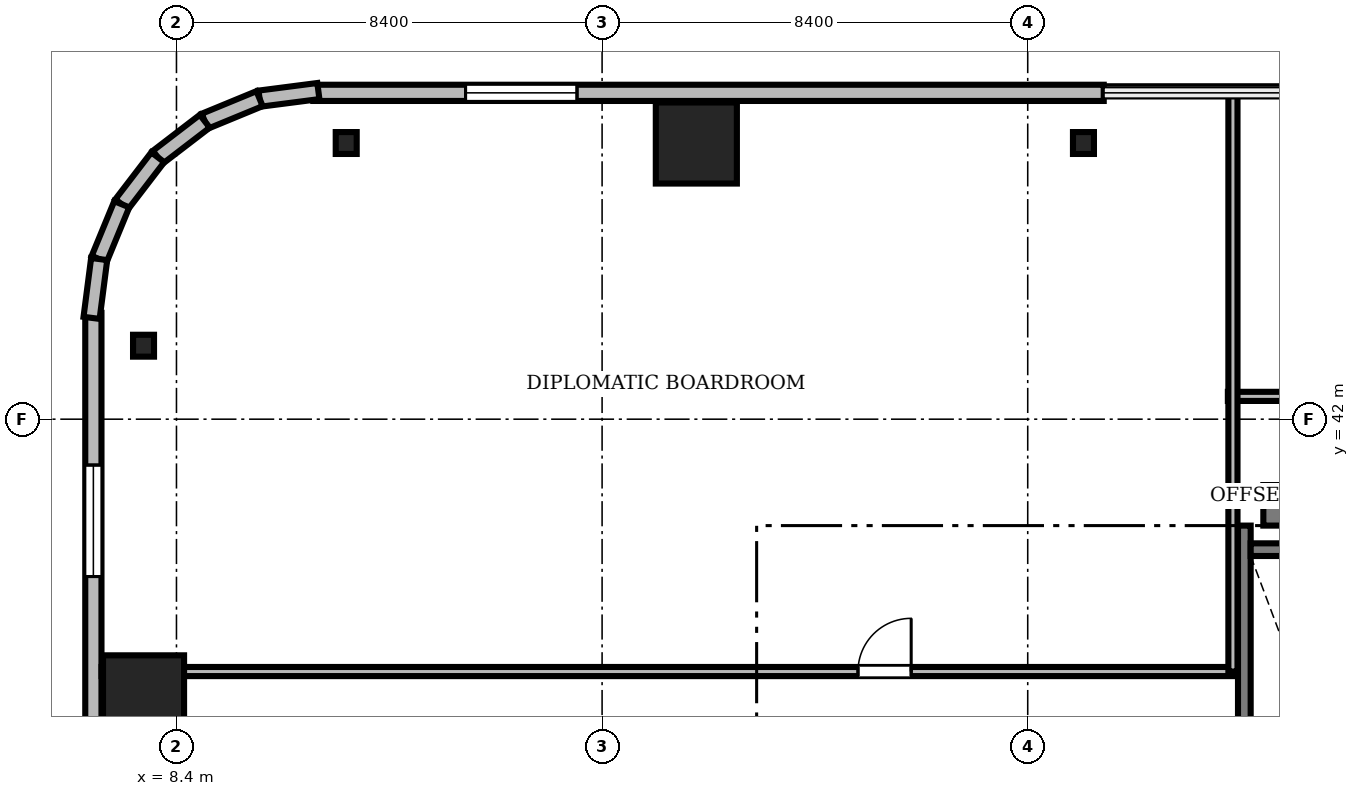
"""IFC4 building model, lengths in metres.
Left out: names, types, materials, properties, quantities, classifications, styles, units other than length and angle.
Written with IfcOpenShell. Run it as: python <this file> out.ifc"""

import sys

from ifc_helpers import new_model, si_unit, direction, frame, frame_2d, origin, origin_2d, place, context, subcontext, project, spatial, rectangle, i_section, extrude, source, transform, mapped, element, fill, save


model = new_model("IFC4")
c1 = context("Model", 3, precision=1e-05, world=origin(), true_north=direction((0.0, 1.0)))
c2 = subcontext(c1, "Body", "Model", "MODEL_VIEW")
j1 = project(units=[si_unit("LENGTHUNIT", "METRE"), si_unit("PLANEANGLEUNIT", "RADIAN")], contexts=[c1])
p1 = place(None, origin())
s1 = spatial("IfcSite", under=j1, at=p1, CompositionType="ELEMENT")
p2 = place(p1, origin())
s2 = spatial("IfcBuilding", under=s1, at=p2, CompositionType="ELEMENT")
p3 = place(p2, frame((0.0, 0.0, 107.5)))
s3 = spatial("IfcBuildingStorey", under=s2, at=p3, CompositionType="ELEMENT", Elevation=107.5)
m1 = source(origin(), c2, "Body", "SweptSolid", [
    extrude(rectangle(XDim=17.52, YDim=0.8, at=frame_2d((8.76, 0.0))), origin(), (0.0, 0.0, 1.0), 3.56),
])
p4 = place(p3, frame((29.85, 40.3, 0.0), z_axis=(0.0, 0.0, 1.0), x_axis=(1.0, 0.0, 0.0)))
e1 = element("IfcWall", 1, at=p4, inside=s3, PredefinedType="SHEAR", context=c2, shape_type="MappedRepresentation", body=[
    mapped(m1, transform((0.0, 0.0, 0.0), scale=1.0)),
])
m2 = source(origin(), c2, "Body", "SweptSolid", [
    extrude(rectangle(XDim=1.6, YDim=1.6, at=origin_2d()), origin(), (0.0, 0.0, 1.0), 3.56),
])
for number, where, z_axis, x_axis in (
    (2, (18.66, 47.45, 0.0), (0.0, 0.0, 1.0), (1.0, 0.0, 0.0)),
    (3, (7.75, 36.54, 0.0), (0.0, 0.0, 1.0), (1.0, 0.0, 0.0)),
):
    element("IfcColumn", number, at=place(p3, frame(where, z_axis=z_axis, x_axis=x_axis)), inside=s3, PredefinedType="COLUMN", context=c2, shape_type="MappedRepresentation", body=[
        mapped(m2, transform((0.0, 0.0, 0.0), scale=1.0)),
    ])
m3 = source(origin(), c2, "Body", "SweptSolid", [
    extrude(i_section(OverallWidth=0.414, OverallDepth=0.432, WebThickness=0.026, FlangeThickness=0.04, FilletRadius=0.015, at=origin_2d()), origin(), (0.0, 0.0, 1.0), 3.56),
])
for number, where, z_axis, x_axis in (
    (4, (26.3, 47.45, 0.0), (0.0, 0.0, 1.0), (1.0, 0.0, 0.0)),
    (5, (11.75, 47.45, 0.0), (0.0, 0.0, 1.0), (1.0, 0.0, 0.0)),
    (6, (7.75, 43.45, 0.0), (0.0, 0.0, 1.0), (1.0, 0.0, 0.0)),
):
    element("IfcColumn", number, at=place(p3, frame(where, z_axis=z_axis, x_axis=x_axis)), inside=s3, PredefinedType="COLUMN", context=c2, shape_type="MappedRepresentation", body=[
        mapped(m3, transform((0.0, 0.0, 0.0), scale=1.0)),
    ])
m4 = source(origin(), c2, "Body", "SweptSolid", [
    extrude(rectangle(XDim=15.6, YDim=0.32, at=frame_2d((7.8, 0.0))), origin(), (0.0, 0.0, 1.0), 3.56),
])
p5 = place(p3, frame((26.7, 48.44, 0.0), z_axis=(0.0, 0.0, 1.0), x_axis=(-1.0, 0.0, 0.0)))
e7 = element("IfcWall", 7, at=p5, inside=s3, PredefinedType="SOLIDWALL", context=c2, shape_type="MappedRepresentation", body=[
    mapped(m4, transform((0.0, 0.0, 0.0), scale=1.0)),
])
m5 = source(origin(), c2, "Body", "SweptSolid", [
    extrude(rectangle(XDim=2.2, YDim=2.4, at=frame_2d((1.1, 1.2))), frame((0.0, 0.17, 0.0), z_axis=(0.0, -1.0, 0.0), x_axis=(1.0, 0.0, 0.0)), (0.0, 0.0, 1.0), 0.34),
])
p6 = place(p5, frame((10.395, 0.0, 0.72)))
e8 = element("IfcOpeningElement", 8, at=p6, cuts=e7, PredefinedType="OPENING", context=c2, shape_type="MappedRepresentation", body=[
    mapped(m5, transform((0.0, 0.0, 0.0), scale=1.0)),
])
m6 = source(origin(), c2, "Body", "SweptSolid", [
    extrude(rectangle(XDim=15.6, YDim=0.32, at=frame_2d((7.8, 0.0))), origin(), (0.0, 0.0, 1.0), 3.56),
])
p7 = place(p3, frame((6.76, 44.1, 0.0), z_axis=(0.0, 0.0, 1.0), x_axis=(0.0, -1.0, 0.0)))
e9 = element("IfcWall", 9, at=p7, inside=s3, PredefinedType="SOLIDWALL", context=c2, shape_type="MappedRepresentation", body=[
    mapped(m6, transform((0.0, 0.0, 0.0), scale=1.0)),
])
m7 = source(origin(), c2, "Body", "SweptSolid", [
    extrude(rectangle(XDim=1.4, YDim=2.3, at=frame_2d((0.7, 1.15))), frame((0.0, 0.17, 0.0), z_axis=(0.0, -1.0, 0.0), x_axis=(1.0, 0.0, 0.0)), (0.0, 0.0, 1.0), 0.34),
])
p8 = place(p7, frame((9.61, 0.0, 0.0)))
e10 = element("IfcOpeningElement", 10, at=p8, cuts=e9, PredefinedType="OPENING", context=c2, shape_type="MappedRepresentation", body=[
    mapped(m7, transform((0.0, 0.0, 0.0), scale=1.0)),
])
p9 = place(p7, frame((3.005, 0.0, 0.72)))
e11 = element("IfcOpeningElement", 11, at=p9, cuts=e9, PredefinedType="OPENING", context=c2, shape_type="MappedRepresentation", body=[
    mapped(m5, transform((0.0, 0.0, 0.0), scale=1.0)),
])
m8 = source(origin(), c2, "Body", "SweptSolid", [
    extrude(rectangle(XDim=1.17, YDim=0.32, at=frame_2d((0.585, 0.0))), origin(), (0.0, 0.0, 1.0), 3.56),
])
p10 = place(p3, frame((11.2, 48.476, 0.0), z_axis=(0.0, 0.0, 1.0), x_axis=(-0.991735963317, -0.128295670475, 0.0)))
e12 = element("IfcWall", 12, at=p10, inside=s3, PredefinedType="SOLIDWALL", context=c2, shape_type="MappedRepresentation", body=[
    mapped(m8, transform((0.0, 0.0, 0.0), scale=1.0)),
])
m9 = source(origin(), c2, "Body", "SweptSolid", [
    extrude(rectangle(XDim=1.169, YDim=0.32, at=frame_2d((0.584, 0.0))), origin(), (0.0, 0.0, 1.0), 3.56),
])
p11 = place(p3, frame((10.04, 48.325, 0.0), z_axis=(0.0, 0.0, 1.0), x_axis=(-0.924552646638, -0.381054331552, 0.0)))
e13 = element("IfcWall", 13, at=p11, inside=s3, PredefinedType="SOLIDWALL", context=c2, shape_type="MappedRepresentation", body=[
    mapped(m9, transform((0.0, 0.0, 0.0), scale=1.0)),
])
m10 = source(origin(), c2, "Body", "SweptSolid", [
    extrude(rectangle(XDim=1.169, YDim=0.32, at=frame_2d((0.584, 0.0))), origin(), (0.0, 0.0, 1.0), 3.56),
])
p12 = place(p3, frame((8.959, 47.88, 0.0), z_axis=(0.0, 0.0, 1.0), x_axis=(-0.793663520347, -0.608356981114, 0.0)))
e14 = element("IfcWall", 14, at=p12, inside=s3, PredefinedType="SOLIDWALL", context=c2, shape_type="MappedRepresentation", body=[
    mapped(m10, transform((0.0, 0.0, 0.0), scale=1.0)),
])
m11 = source(origin(), c2, "Body", "SweptSolid", [
    extrude(rectangle(XDim=1.169, YDim=0.32, at=frame_2d((0.584, 0.0))), origin(), (0.0, 0.0, 1.0), 3.56),
])
p13 = place(p3, frame((8.031, 47.169, 0.0), z_axis=(0.0, 0.0, 1.0), x_axis=(-0.608387696831, -0.793639975269, 0.0)))
e15 = element("IfcWall", 15, at=p13, inside=s3, PredefinedType="SOLIDWALL", context=c2, shape_type="MappedRepresentation", body=[
    mapped(m11, transform((0.0, 0.0, 0.0), scale=1.0)),
])
p14 = place(p3, frame((7.32, 46.241, 0.0), z_axis=(0.0, 0.0, 1.0), x_axis=(-0.381054331552, -0.924552646638, 0.0)))
e16 = element("IfcWall", 16, at=p14, inside=s3, PredefinedType="SOLIDWALL", context=c2, shape_type="MappedRepresentation", body=[
    mapped(m9, transform((0.0, 0.0, 0.0), scale=1.0)),
])
p15 = place(p3, frame((6.875, 45.16, 0.0), z_axis=(0.0, 0.0, 1.0), x_axis=(-0.128295670475, -0.991735963317, 0.0)))
e17 = element("IfcWall", 17, at=p15, inside=s3, PredefinedType="SOLIDWALL", context=c2, shape_type="MappedRepresentation", body=[
    mapped(m8, transform((0.0, 0.0, 0.0), scale=1.0)),
])
m12 = source(origin(), c2, "Body", "SweptSolid", [
    extrude(rectangle(XDim=9.25, YDim=0.25, at=frame_2d((4.625, 0.0))), origin(), (0.0, 0.0, 1.0), 3.6),
])
p16 = place(p3, frame((29.475, 30.65, 0.0), z_axis=(0.0, 0.0, 1.0), x_axis=(0.0, 1.0, 0.0)))
e18 = element("IfcWall", 18, at=p16, inside=s3, PredefinedType="SOLIDWALL", context=c2, shape_type="MappedRepresentation", body=[
    mapped(m12, transform((0.0, 0.0, 0.0), scale=1.0)),
])
m13 = source(origin(), c2, "Body", "SweptSolid", [
    extrude(rectangle(XDim=3.15, YDim=0.25, at=frame_2d((1.575, 0.0))), origin(), (0.0, 0.0, 1.0), 3.6),
])
p17 = place(p3, frame((29.6, 39.425, 0.0), z_axis=(0.0, 0.0, 1.0), x_axis=(1.0, 0.0, 0.0)))
e19 = element("IfcWall", 19, at=p17, inside=s3, PredefinedType="SOLIDWALL", context=c2, shape_type="MappedRepresentation", body=[
    mapped(m13, transform((0.0, 0.0, 0.0), scale=1.0)),
])
m14 = source(origin(), c2, "Body", "SweptSolid", [
    extrude(rectangle(XDim=23.928, YDim=0.18, at=frame_2d((11.964, 0.0))), origin(), (0.0, 0.0, 1.0), 2.802),
])
p18 = place(p3, frame((29.15, 42.45, 0.0), z_axis=(0.0, 0.0, 1.0), x_axis=(1.0, 0.0, 0.0)))
e20 = element("IfcWall", 20, at=p18, inside=s3, PredefinedType="PARTITIONING", context=c2, shape_type="MappedRepresentation", body=[
    mapped(m14, transform((0.0, 0.0, 0.0), scale=1.0)),
])
m15 = source(origin(), c2, "Body", "SweptSolid", [
    extrude(rectangle(XDim=1.05, YDim=2.2, at=frame_2d((0.525, 1.1))), frame((0.0, 0.1, 0.0), z_axis=(0.0, -1.0, 0.0), x_axis=(1.0, 0.0, 0.0)), (0.0, 0.0, 1.0), 0.2),
])
p19 = place(p18, frame((4.5, 0.0, 0.0)))
e21 = element("IfcOpeningElement", 21, at=p19, cuts=e20, PredefinedType="OPENING", context=c2, shape_type="MappedRepresentation", body=[
    mapped(m15, transform((0.0, 0.0, 0.0), scale=1.0)),
])
m16 = source(origin(), c2, "Body", "SweptSolid", [
    extrude(rectangle(XDim=22.328, YDim=0.18, at=frame_2d((11.164, 0.0))), origin(), (0.0, 0.0, 1.0), 2.802),
])
p20 = place(p3, frame((6.922, 37.02, 0.0), z_axis=(0.0, 0.0, 1.0), x_axis=(1.0, 0.0, 0.0)))
e22 = element("IfcWall", 22, at=p20, inside=s3, PredefinedType="PARTITIONING", context=c2, shape_type="MappedRepresentation", body=[
    mapped(m16, transform((0.0, 0.0, 0.0), scale=1.0)),
])
p21 = place(p20, frame((14.928, 0.0, 0.0)))
e23 = element("IfcOpeningElement", 23, at=p21, cuts=e22, PredefinedType="OPENING", context=c2, shape_type="MappedRepresentation", body=[
    mapped(m15, transform((0.0, 0.0, 0.0), scale=1.0)),
])
m17 = source(origin(), c2, "Body", "SweptSolid", [
    extrude(rectangle(XDim=11.45, YDim=0.18, at=frame_2d((5.725, 0.0))), origin(), (0.0, 0.0, 1.0), 2.802),
])
p22 = place(p3, frame((29.25, 37.02, 0.0), z_axis=(0.0, 0.0, 1.0), x_axis=(0.0, 1.0, 0.0)))
e24 = element("IfcWall", 24, at=p22, inside=s3, PredefinedType="PARTITIONING", context=c2, shape_type="MappedRepresentation", body=[
    mapped(m17, transform((0.0, 0.0, 0.0), scale=1.0)),
])
m18 = source(origin(), c2, "Body", "SweptSolid", [
    extrude(rectangle(XDim=2.2, YDim=2.4, at=frame_2d((1.1, 1.2))), frame((0.0, 0.03, 0.0), z_axis=(0.0, -1.0, 0.0), x_axis=(1.0, 0.0, 0.0)), (0.0, 0.0, 1.0), 0.06),
])
p23 = place(p6, origin())
e25 = element("IfcWindow", 25, at=p23, inside=s3, PartitioningType="SINGLE_PANEL", PredefinedType="WINDOW", context=c2, shape_type="MappedRepresentation", body=[
    mapped(m18, transform((0.0, 0.0, 0.0), scale=1.0)),
])
fill(e8, e25)
p24 = place(p9, origin())
e26 = element("IfcWindow", 26, at=p24, inside=s3, PartitioningType="SINGLE_PANEL", PredefinedType="WINDOW", context=c2, shape_type="MappedRepresentation", body=[
    mapped(m18, transform((0.0, 0.0, 0.0), scale=1.0)),
])
fill(e11, e26)
m19 = source(origin(), c2, "Body", "SweptSolid", [
    extrude(rectangle(XDim=1.05, YDim=2.2, at=frame_2d((0.525, 1.1))), frame((0.0, 0.025, 0.0), z_axis=(0.0, -1.0, 0.0), x_axis=(1.0, 0.0, 0.0)), (0.0, 0.0, 1.0), 0.05),
])
p25 = place(p21, origin())
e27 = element("IfcDoor", 27, at=p25, inside=s3, OperationType="SINGLE_SWING_RIGHT", PredefinedType="DOOR", context=c2, shape_type="MappedRepresentation", body=[
    mapped(m19, transform((0.0, 0.0, 0.0), scale=1.0)),
])
fill(e23, e27)
save(model, sys.argv[1])
